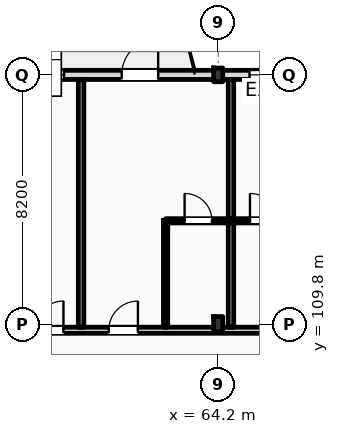
"""IFC4 building model, lengths in metres.
Left out: names, types, materials, properties, quantities, classifications, styles, units other than length and angle.
Written with IfcOpenShell. Run it as: python <this file> out.ifc"""

import sys

from ifc_helpers import new_model, si_unit, direction, frame, frame_2d, origin, origin_2d, place, context, subcontext, project, spatial, rectangle, i_section, extrude, element, fill, save


model = new_model("IFC4")
c1 = context("Model", 3, precision=1e-05, world=origin(), true_north=direction((0.0, 1.0)))
c2 = subcontext(c1, "Body", "Model", "MODEL_VIEW")
j1 = project(units=[si_unit("LENGTHUNIT", "METRE"), si_unit("PLANEANGLEUNIT", "RADIAN")], contexts=[c1])
p1 = place(None, origin())
s1 = spatial("IfcSite", under=j1, at=p1, CompositionType="ELEMENT")
p2 = place(p1, origin())
s2 = spatial("IfcBuilding", under=s1, at=p2, CompositionType="ELEMENT")
p3 = place(p2, frame((0.0, 0.0, 31.8)))
s3 = spatial("IfcBuildingStorey", under=s2, at=p3, CompositionType="ELEMENT", Elevation=31.8)
p4 = place(p3, frame((64.2, 109.8, 0.0), z_axis=(0.0, 0.0, 1.0), x_axis=(1.0, 0.0, 0.0)))
e1 = element("IfcColumn", 1, at=p4, inside=s3, PredefinedType="COLUMN", context=c2, shape_type="SweptSolid", body=[
    extrude(i_section(OverallWidth=0.3, OverallDepth=0.5, WebThickness=0.014, FlangeThickness=0.028, FilletRadius=0.027, at=origin_2d()), origin(), (0.0, 0.0, 1.0), 3.6),
])
p5 = place(p3, frame((64.2, 118.0, 0.0), z_axis=(0.0, 0.0, 1.0), x_axis=(1.0, 0.0, 0.0)))
e2 = element("IfcColumn", 2, at=p5, inside=s3, PredefinedType="COLUMN", context=c2, shape_type="SweptSolid", body=[
    extrude(i_section(OverallWidth=0.3, OverallDepth=0.45, WebThickness=0.014, FlangeThickness=0.026, FilletRadius=0.027, at=origin_2d()), origin(), (0.0, 0.0, 1.0), 3.6),
])
p6 = place(p3, frame((22.5, 118.0, 0.0), z_axis=(0.0, 0.0, 1.0), x_axis=(1.0, 0.0, 0.0)))
e3 = element("IfcWall", 3, at=p6, inside=s3, PredefinedType="STANDARD", context=c2, shape_type="SweptSolid", body=[
    extrude(rectangle(XDim=97.5, YDim=0.3, at=frame_2d((48.75, 0.0))), origin(), (0.0, 0.0, 1.0), 2.72),
])
p7 = place(p6, frame((3.61, 0.0, 0.9)))
e4 = element("IfcOpeningElement", 4, at=p7, cuts=e3, PredefinedType="OPENING", context=c2, shape_type="SweptSolid", body=[
    extrude(rectangle(XDim=1.1, YDim=1.64, at=frame_2d((0.55, 0.82))), frame((0.0, 0.16, 0.0), z_axis=(0.0, -1.0, 0.0), x_axis=(1.0, 0.0, 0.0)), (0.0, 0.0, 1.0), 0.32),
])
p8 = place(p6, frame((6.855, 0.0, 0.0)))
e5 = element("IfcOpeningElement", 5, at=p8, cuts=e3, PredefinedType="OPENING", context=c2, shape_type="SweptSolid", body=[
    extrude(rectangle(XDim=1.2, YDim=2.25, at=frame_2d((0.6, 1.125))), frame((0.0, 0.16, 0.0), z_axis=(0.0, -1.0, 0.0), x_axis=(1.0, 0.0, 0.0)), (0.0, 0.0, 1.0), 0.32),
])
p9 = place(p6, frame((11.405, 0.0, 0.9)))
e6 = element("IfcOpeningElement", 6, at=p9, cuts=e3, PredefinedType="OPENING", context=c2, shape_type="SweptSolid", body=[
    extrude(rectangle(XDim=2.1, YDim=1.64, at=frame_2d((1.05, 0.82))), frame((0.0, 0.16, 0.0), z_axis=(0.0, -1.0, 0.0), x_axis=(1.0, 0.0, 0.0)), (0.0, 0.0, 1.0), 0.32),
])
p10 = place(p6, frame((15.13, 0.0, 0.9)))
e7 = element("IfcOpeningElement", 7, at=p10, cuts=e3, PredefinedType="OPENING", context=c2, shape_type="SweptSolid", body=[
    extrude(rectangle(XDim=2.25, YDim=1.64, at=frame_2d((1.125, 0.82))), frame((0.0, 0.16, 0.0), z_axis=(0.0, -1.0, 0.0), x_axis=(1.0, 0.0, 0.0)), (0.0, 0.0, 1.0), 0.32),
])
p11 = place(p6, frame((21.53, 0.0, 0.0)))
e8 = element("IfcOpeningElement", 8, at=p11, cuts=e3, PredefinedType="OPENING", context=c2, shape_type="SweptSolid", body=[
    extrude(rectangle(XDim=1.2, YDim=2.25, at=frame_2d((0.6, 1.125))), frame((0.0, 0.16, 0.0), z_axis=(0.0, -1.0, 0.0), x_axis=(1.0, 0.0, 0.0)), (0.0, 0.0, 1.0), 0.32),
])
p12 = place(p6, frame((24.18, 0.0, 0.9)))
e9 = element("IfcOpeningElement", 9, at=p12, cuts=e3, PredefinedType="OPENING", context=c2, shape_type="SweptSolid", body=[
    extrude(rectangle(XDim=1.1, YDim=1.64, at=frame_2d((0.55, 0.82))), frame((0.0, 0.16, 0.0), z_axis=(0.0, -1.0, 0.0), x_axis=(1.0, 0.0, 0.0)), (0.0, 0.0, 1.0), 0.32),
])
p13 = place(p6, frame((29.105, 0.0, 0.9)))
e10 = element("IfcOpeningElement", 10, at=p13, cuts=e3, PredefinedType="OPENING", context=c2, shape_type="SweptSolid", body=[
    extrude(rectangle(XDim=2.7, YDim=1.64, at=frame_2d((1.35, 0.82))), frame((0.0, 0.16, 0.0), z_axis=(0.0, -1.0, 0.0), x_axis=(1.0, 0.0, 0.0)), (0.0, 0.0, 1.0), 0.32),
])
p14 = place(p6, frame((34.83, 0.0, 0.9)))
e11 = element("IfcOpeningElement", 11, at=p14, cuts=e3, PredefinedType="OPENING", context=c2, shape_type="SweptSolid", body=[
    extrude(rectangle(XDim=1.8, YDim=1.64, at=frame_2d((0.9, 0.82))), frame((0.0, 0.16, 0.0), z_axis=(0.0, -1.0, 0.0), x_axis=(1.0, 0.0, 0.0)), (0.0, 0.0, 1.0), 0.32),
])
p15 = place(p6, frame((38.525, 0.0, 0.0)))
e12 = element("IfcOpeningElement", 12, at=p15, cuts=e3, PredefinedType="OPENING", context=c2, shape_type="SweptSolid", body=[
    extrude(rectangle(XDim=1.2, YDim=2.25, at=frame_2d((0.6, 1.125))), frame((0.0, 0.16, 0.0), z_axis=(0.0, -1.0, 0.0), x_axis=(1.0, 0.0, 0.0)), (0.0, 0.0, 1.0), 0.32),
])
p16 = place(p6, frame((42.73, 0.0, 0.9)))
e13 = element("IfcOpeningElement", 13, at=p16, cuts=e3, PredefinedType="OPENING", context=c2, shape_type="SweptSolid", body=[
    extrude(rectangle(XDim=3.05, YDim=1.64, at=frame_2d((1.525, 0.82))), frame((0.0, 0.16, 0.0), z_axis=(0.0, -1.0, 0.0), x_axis=(1.0, 0.0, 0.0)), (0.0, 0.0, 1.0), 0.32),
])
p17 = place(p6, frame((47.155, 0.0, 0.9)))
e14 = element("IfcOpeningElement", 14, at=p17, cuts=e3, PredefinedType="OPENING", context=c2, shape_type="SweptSolid", body=[
    extrude(rectangle(XDim=1.35, YDim=1.64, at=frame_2d((0.675, 0.82))), frame((0.0, 0.16, 0.0), z_axis=(0.0, -1.0, 0.0), x_axis=(1.0, 0.0, 0.0)), (0.0, 0.0, 1.0), 0.32),
])
p18 = place(p6, frame((53.065, 0.0, 0.0)))
e15 = element("IfcOpeningElement", 15, at=p18, cuts=e3, PredefinedType="OPENING", context=c2, shape_type="SweptSolid", body=[
    extrude(rectangle(XDim=1.2, YDim=2.25, at=frame_2d((0.6, 1.125))), frame((0.0, 0.16, 0.0), z_axis=(0.0, -1.0, 0.0), x_axis=(1.0, 0.0, 0.0)), (0.0, 0.0, 1.0), 0.32),
])
p19 = place(p6, frame((58.2, 0.0, 0.9)))
e16 = element("IfcOpeningElement", 16, at=p19, cuts=e3, PredefinedType="OPENING", context=c2, shape_type="SweptSolid", body=[
    extrude(rectangle(XDim=1.8, YDim=1.64, at=frame_2d((0.9, 0.82))), frame((0.0, 0.16, 0.0), z_axis=(0.0, -1.0, 0.0), x_axis=(1.0, 0.0, 0.0)), (0.0, 0.0, 1.0), 0.32),
])
p20 = place(p6, frame((61.13, 0.0, 0.9)))
e17 = element("IfcOpeningElement", 17, at=p20, cuts=e3, PredefinedType="OPENING", context=c2, shape_type="SweptSolid", body=[
    extrude(rectangle(XDim=3.05, YDim=1.64, at=frame_2d((1.525, 0.82))), frame((0.0, 0.16, 0.0), z_axis=(0.0, -1.0, 0.0), x_axis=(1.0, 0.0, 0.0)), (0.0, 0.0, 1.0), 0.32),
])
p21 = place(p6, frame((67.93, 0.0, 0.0)))
e18 = element("IfcOpeningElement", 18, at=p21, cuts=e3, PredefinedType="OPENING", context=c2, shape_type="SweptSolid", body=[
    extrude(rectangle(XDim=1.2, YDim=2.25, at=frame_2d((0.6, 1.125))), frame((0.0, 0.16, 0.0), z_axis=(0.0, -1.0, 0.0), x_axis=(1.0, 0.0, 0.0)), (0.0, 0.0, 1.0), 0.32),
])
p22 = place(p6, frame((70.39, 0.0, 0.0)))
e19 = element("IfcOpeningElement", 19, at=p22, cuts=e3, PredefinedType="OPENING", context=c2, shape_type="SweptSolid", body=[
    extrude(rectangle(XDim=1.2, YDim=2.25, at=frame_2d((0.6, 1.125))), frame((0.0, 0.16, 0.0), z_axis=(0.0, -1.0, 0.0), x_axis=(1.0, 0.0, 0.0)), (0.0, 0.0, 1.0), 0.32),
])
p23 = place(p6, frame((75.905, 0.0, 0.9)))
e20 = element("IfcOpeningElement", 20, at=p23, cuts=e3, PredefinedType="OPENING", context=c2, shape_type="SweptSolid", body=[
    extrude(rectangle(XDim=1.1, YDim=1.5, at=frame_2d((0.55, 0.75))), frame((0.0, 0.16, 0.0), z_axis=(0.0, -1.0, 0.0), x_axis=(1.0, 0.0, 0.0)), (0.0, 0.0, 1.0), 0.32),
])
p24 = place(p6, frame((81.63, 0.0, 0.9)))
e21 = element("IfcOpeningElement", 21, at=p24, cuts=e3, PredefinedType="OPENING", context=c2, shape_type="SweptSolid", body=[
    extrude(rectangle(XDim=1.1, YDim=1.6, at=frame_2d((0.55, 0.8))), frame((0.0, 0.16, 0.0), z_axis=(0.0, -1.0, 0.0), x_axis=(1.0, 0.0, 0.0)), (0.0, 0.0, 1.0), 0.32),
])
p25 = place(p6, frame((84.955, 0.0, 0.9)))
e22 = element("IfcOpeningElement", 22, at=p25, cuts=e3, PredefinedType="OPENING", context=c2, shape_type="SweptSolid", body=[
    extrude(rectangle(XDim=1.4, YDim=1.64, at=frame_2d((0.7, 0.82))), frame((0.0, 0.16, 0.0), z_axis=(0.0, -1.0, 0.0), x_axis=(1.0, 0.0, 0.0)), (0.0, 0.0, 1.0), 0.32),
])
p26 = place(p6, frame((90.055, 0.0, 0.9)))
e23 = element("IfcOpeningElement", 23, at=p26, cuts=e3, PredefinedType="OPENING", context=c2, shape_type="SweptSolid", body=[
    extrude(rectangle(XDim=1.6, YDim=1.64, at=frame_2d((0.8, 0.82))), frame((0.0, 0.16, 0.0), z_axis=(0.0, -1.0, 0.0), x_axis=(1.0, 0.0, 0.0)), (0.0, 0.0, 1.0), 0.32),
])
p27 = place(p6, frame((93.87, 0.0, 0.9)))
e24 = element("IfcOpeningElement", 24, at=p27, cuts=e3, PredefinedType="OPENING", context=c2, shape_type="SweptSolid", body=[
    extrude(rectangle(XDim=1.75, YDim=1.64, at=frame_2d((0.875, 0.82))), frame((0.0, 0.16, 0.0), z_axis=(0.0, -1.0, 0.0), x_axis=(1.0, 0.0, 0.0)), (0.0, 0.0, 1.0), 0.32),
])
p28 = place(p3, frame((10.65, 109.6, 0.0), z_axis=(0.0, 0.0, 1.0), x_axis=(1.0, 0.0, 0.0)))
e25 = element("IfcWall", 25, at=p28, inside=s3, PredefinedType="PARTITIONING", context=c2, shape_type="SweptSolid", body=[
    extrude(rectangle(XDim=109.21, YDim=0.2, at=frame_2d((54.605, 0.0))), origin(), (0.0, 0.0, 1.0), 2.72),
])
p29 = place(p28, frame((15.825, 0.0, 0.0)))
e26 = element("IfcOpeningElement", 26, at=p29, cuts=e25, PredefinedType="OPENING", context=c2, shape_type="SweptSolid", body=[
    extrude(rectangle(XDim=1.02, YDim=2.2, at=frame_2d((0.51, 1.1))), frame((0.0, 0.11, 0.0), z_axis=(0.0, -1.0, 0.0), x_axis=(1.0, 0.0, 0.0)), (0.0, 0.0, 1.0), 0.22),
])
p30 = place(p28, frame((19.87, 0.0, 0.0)))
e27 = element("IfcOpeningElement", 27, at=p30, cuts=e25, PredefinedType="OPENING", context=c2, shape_type="SweptSolid", body=[
    extrude(rectangle(XDim=1.02, YDim=2.2, at=frame_2d((0.51, 1.1))), frame((0.0, 0.11, 0.0), z_axis=(0.0, -1.0, 0.0), x_axis=(1.0, 0.0, 0.0)), (0.0, 0.0, 1.0), 0.22),
])
p31 = place(p28, frame((24.47, 0.0, 0.0)))
e28 = element("IfcOpeningElement", 28, at=p31, cuts=e25, PredefinedType="OPENING", context=c2, shape_type="SweptSolid", body=[
    extrude(rectangle(XDim=1.02, YDim=2.2, at=frame_2d((0.51, 1.1))), frame((0.0, 0.11, 0.0), z_axis=(0.0, -1.0, 0.0), x_axis=(1.0, 0.0, 0.0)), (0.0, 0.0, 1.0), 0.22),
])
p32 = place(p28, frame((26.92, 0.0, 0.0)))
e29 = element("IfcOpeningElement", 29, at=p32, cuts=e25, PredefinedType="OPENING", context=c2, shape_type="SweptSolid", body=[
    extrude(rectangle(XDim=1.02, YDim=2.2, at=frame_2d((0.51, 1.1))), frame((0.0, 0.11, 0.0), z_axis=(0.0, -1.0, 0.0), x_axis=(1.0, 0.0, 0.0)), (0.0, 0.0, 1.0), 0.22),
])
p33 = place(p28, frame((33.7, 0.0, 0.0)))
e30 = element("IfcOpeningElement", 30, at=p33, cuts=e25, PredefinedType="OPENING", context=c2, shape_type="SweptSolid", body=[
    extrude(rectangle(XDim=0.96, YDim=2.2, at=frame_2d((0.48, 1.1))), frame((0.0, 0.11, 0.0), z_axis=(0.0, -1.0, 0.0), x_axis=(1.0, 0.0, 0.0)), (0.0, 0.0, 1.0), 0.22),
])
p34 = place(p28, frame((35.9, 0.0, 0.0)))
e31 = element("IfcOpeningElement", 31, at=p34, cuts=e25, PredefinedType="OPENING", context=c2, shape_type="SweptSolid", body=[
    extrude(rectangle(XDim=0.96, YDim=2.2, at=frame_2d((0.48, 1.1))), frame((0.0, 0.11, 0.0), z_axis=(0.0, -1.0, 0.0), x_axis=(1.0, 0.0, 0.0)), (0.0, 0.0, 1.0), 0.22),
])
p35 = place(p28, frame((42.9, 0.0, 0.0)))
e32 = element("IfcOpeningElement", 32, at=p35, cuts=e25, PredefinedType="OPENING", context=c2, shape_type="SweptSolid", body=[
    extrude(rectangle(XDim=0.96, YDim=2.2, at=frame_2d((0.48, 1.1))), frame((0.0, 0.11, 0.0), z_axis=(0.0, -1.0, 0.0), x_axis=(1.0, 0.0, 0.0)), (0.0, 0.0, 1.0), 0.22),
])
p36 = place(p28, frame((47.5, 0.0, 0.0)))
e33 = element("IfcOpeningElement", 33, at=p36, cuts=e25, PredefinedType="OPENING", context=c2, shape_type="SweptSolid", body=[
    extrude(rectangle(XDim=0.96, YDim=2.2, at=frame_2d((0.48, 1.1))), frame((0.0, 0.11, 0.0), z_axis=(0.0, -1.0, 0.0), x_axis=(1.0, 0.0, 0.0)), (0.0, 0.0, 1.0), 0.22),
])
p37 = place(p28, frame((49.95, 0.0, 0.0)))
e34 = element("IfcOpeningElement", 34, at=p37, cuts=e25, PredefinedType="OPENING", context=c2, shape_type="SweptSolid", body=[
    extrude(rectangle(XDim=0.96, YDim=2.2, at=frame_2d((0.48, 1.1))), frame((0.0, 0.11, 0.0), z_axis=(0.0, -1.0, 0.0), x_axis=(1.0, 0.0, 0.0)), (0.0, 0.0, 1.0), 0.22),
])
p38 = place(p28, frame((56.7, 0.0, 0.0)))
e35 = element("IfcOpeningElement", 35, at=p38, cuts=e25, PredefinedType="OPENING", context=c2, shape_type="SweptSolid", body=[
    extrude(rectangle(XDim=0.96, YDim=2.2, at=frame_2d((0.48, 1.1))), frame((0.0, 0.11, 0.0), z_axis=(0.0, -1.0, 0.0), x_axis=(1.0, 0.0, 0.0)), (0.0, 0.0, 1.0), 0.22),
])
p39 = place(p28, frame((59.15, 0.0, 0.0)))
e36 = element("IfcOpeningElement", 36, at=p39, cuts=e25, PredefinedType="OPENING", context=c2, shape_type="SweptSolid", body=[
    extrude(rectangle(XDim=0.96, YDim=2.2, at=frame_2d((0.48, 1.1))), frame((0.0, 0.11, 0.0), z_axis=(0.0, -1.0, 0.0), x_axis=(1.0, 0.0, 0.0)), (0.0, 0.0, 1.0), 0.22),
])
p40 = place(p28, frame((65.9, 0.0, 0.0)))
e37 = element("IfcOpeningElement", 37, at=p40, cuts=e25, PredefinedType="OPENING", context=c2, shape_type="SweptSolid", body=[
    extrude(rectangle(XDim=0.96, YDim=2.2, at=frame_2d((0.48, 1.1))), frame((0.0, 0.11, 0.0), z_axis=(0.0, -1.0, 0.0), x_axis=(1.0, 0.0, 0.0)), (0.0, 0.0, 1.0), 0.22),
])
p41 = place(p28, frame((70.5, 0.0, 0.0)))
e38 = element("IfcOpeningElement", 38, at=p41, cuts=e25, PredefinedType="OPENING", context=c2, shape_type="SweptSolid", body=[
    extrude(rectangle(XDim=0.96, YDim=2.2, at=frame_2d((0.48, 1.1))), frame((0.0, 0.11, 0.0), z_axis=(0.0, -1.0, 0.0), x_axis=(1.0, 0.0, 0.0)), (0.0, 0.0, 1.0), 0.22),
])
p42 = place(p28, frame((72.95, 0.0, 0.0)))
e39 = element("IfcOpeningElement", 39, at=p42, cuts=e25, PredefinedType="OPENING", context=c2, shape_type="SweptSolid", body=[
    extrude(rectangle(XDim=0.96, YDim=2.2, at=frame_2d((0.48, 1.1))), frame((0.0, 0.11, 0.0), z_axis=(0.0, -1.0, 0.0), x_axis=(1.0, 0.0, 0.0)), (0.0, 0.0, 1.0), 0.22),
])
p43 = place(p28, frame((79.7, 0.0, 0.0)))
e40 = element("IfcOpeningElement", 40, at=p43, cuts=e25, PredefinedType="OPENING", context=c2, shape_type="SweptSolid", body=[
    extrude(rectangle(XDim=0.96, YDim=2.2, at=frame_2d((0.48, 1.1))), frame((0.0, 0.11, 0.0), z_axis=(0.0, -1.0, 0.0), x_axis=(1.0, 0.0, 0.0)), (0.0, 0.0, 1.0), 0.22),
])
p44 = place(p28, frame((82.15, 0.0, 0.0)))
e41 = element("IfcOpeningElement", 41, at=p44, cuts=e25, PredefinedType="OPENING", context=c2, shape_type="SweptSolid", body=[
    extrude(rectangle(XDim=0.96, YDim=2.2, at=frame_2d((0.48, 1.1))), frame((0.0, 0.11, 0.0), z_axis=(0.0, -1.0, 0.0), x_axis=(1.0, 0.0, 0.0)), (0.0, 0.0, 1.0), 0.22),
])
p45 = place(p28, frame((88.9, 0.0, 0.0)))
e42 = element("IfcOpeningElement", 42, at=p45, cuts=e25, PredefinedType="OPENING", context=c2, shape_type="SweptSolid", body=[
    extrude(rectangle(XDim=0.96, YDim=2.2, at=frame_2d((0.48, 1.1))), frame((0.0, 0.11, 0.0), z_axis=(0.0, -1.0, 0.0), x_axis=(1.0, 0.0, 0.0)), (0.0, 0.0, 1.0), 0.22),
])
p46 = place(p28, frame((93.75, 0.0, 0.0)))
e43 = element("IfcOpeningElement", 43, at=p46, cuts=e25, PredefinedType="OPENING", context=c2, shape_type="SweptSolid", body=[
    extrude(rectangle(XDim=0.96, YDim=2.2, at=frame_2d((0.48, 1.1))), frame((0.0, 0.11, 0.0), z_axis=(0.0, -1.0, 0.0), x_axis=(1.0, 0.0, 0.0)), (0.0, 0.0, 1.0), 0.22),
])
p47 = place(p28, frame((98.1, 0.0, 0.0)))
e44 = element("IfcOpeningElement", 44, at=p47, cuts=e25, PredefinedType="OPENING", context=c2, shape_type="SweptSolid", body=[
    extrude(rectangle(XDim=0.96, YDim=2.2, at=frame_2d((0.48, 1.1))), frame((0.0, 0.11, 0.0), z_axis=(0.0, -1.0, 0.0), x_axis=(1.0, 0.0, 0.0)), (0.0, 0.0, 1.0), 0.22),
])
p48 = place(p28, frame((102.7, 0.0, 0.0)))
e45 = element("IfcOpeningElement", 45, at=p48, cuts=e25, PredefinedType="OPENING", context=c2, shape_type="SweptSolid", body=[
    extrude(rectangle(XDim=0.96, YDim=2.2, at=frame_2d((0.48, 1.1))), frame((0.0, 0.11, 0.0), z_axis=(0.0, -1.0, 0.0), x_axis=(1.0, 0.0, 0.0)), (0.0, 0.0, 1.0), 0.22),
])
p49 = place(p28, frame((105.04, 0.0, 0.0)))
e46 = element("IfcOpeningElement", 46, at=p49, cuts=e25, PredefinedType="OPENING", context=c2, shape_type="SweptSolid", body=[
    extrude(rectangle(XDim=0.96, YDim=2.2, at=frame_2d((0.48, 1.1))), frame((0.0, 0.11, 0.0), z_axis=(0.0, -1.0, 0.0), x_axis=(1.0, 0.0, 0.0)), (0.0, 0.0, 1.0), 0.22),
])
p50 = place(p28, frame((2.716, 0.0, 0.0)))
e47 = element("IfcOpeningElement", 47, at=p50, cuts=e25, PredefinedType="OPENING", context=c2, shape_type="SweptSolid", body=[
    extrude(rectangle(XDim=1.35, YDim=2.25, at=frame_2d((0.675, 1.125))), frame((0.0, 0.11, 0.0), z_axis=(0.0, -1.0, 0.0), x_axis=(1.0, 0.0, 0.0)), (0.0, 0.0, 1.0), 0.22),
])
p51 = place(p28, frame((6.65, 0.0, 0.0)))
e48 = element("IfcOpeningElement", 48, at=p51, cuts=e25, PredefinedType="OPENING", context=c2, shape_type="SweptSolid", body=[
    extrude(rectangle(XDim=1.35, YDim=2.25, at=frame_2d((0.675, 1.125))), frame((0.0, 0.11, 0.0), z_axis=(0.0, -1.0, 0.0), x_axis=(1.0, 0.0, 0.0)), (0.0, 0.0, 1.0), 0.22),
])
p52 = place(p28, frame((10.583, 0.0, 0.0)))
e49 = element("IfcOpeningElement", 49, at=p52, cuts=e25, PredefinedType="OPENING", context=c2, shape_type="SweptSolid", body=[
    extrude(rectangle(XDim=1.35, YDim=2.25, at=frame_2d((0.675, 1.125))), frame((0.0, 0.11, 0.0), z_axis=(0.0, -1.0, 0.0), x_axis=(1.0, 0.0, 0.0)), (0.0, 0.0, 1.0), 0.22),
])
for number, where, z_axis, x_axis in (
    (50, (59.69, 109.7, 0.0), (0.0, 0.0, 1.0), (0.0, 1.0, 0.0)),
    (51, (64.62, 109.7, 0.0), (0.0, 0.0, 1.0), (0.0, 1.0, 0.0)),
):
    element("IfcWall", number, at=place(p3, frame(where, z_axis=z_axis, x_axis=x_axis)), inside=s3, PredefinedType="PARTITIONING", context=c2, shape_type="SweptSolid", body=[
        extrude(rectangle(XDim=8.15, YDim=0.18, at=frame_2d((4.075, 0.0))), origin(), (0.0, 0.0, 1.0), 3.36),
    ])
p53 = place(p3, frame((62.47, 109.7, 0.0), z_axis=(0.0, 0.0, 1.0), x_axis=(0.0, 1.0, 0.0)))
e52 = element("IfcWall", 52, at=p53, inside=s3, PredefinedType="PARTITIONING", context=c2, shape_type="SweptSolid", body=[
    extrude(rectangle(XDim=3.5, YDim=0.14, at=frame_2d((1.75, 0.0))), origin(), (0.0, 0.0, 1.0), 3.36),
])
p54 = place(p3, frame((62.47, 113.2, 0.0), z_axis=(0.0, 0.0, 1.0), x_axis=(1.0, 0.0, 0.0)))
e53 = element("IfcWall", 53, at=p54, inside=s3, PredefinedType="PARTITIONING", context=c2, shape_type="SweptSolid", body=[
    extrude(rectangle(XDim=2.15, YDim=0.14, at=frame_2d((1.075, 0.0))), origin(), (0.0, 0.0, 1.0), 3.36),
])
p55 = place(p54, frame((0.625, 0.0, 0.0)))
e54 = element("IfcOpeningElement", 54, at=p55, cuts=e53, PredefinedType="OPENING", context=c2, shape_type="SweptSolid", body=[
    extrude(rectangle(XDim=0.9, YDim=2.1, at=frame_2d((0.45, 1.05))), frame((0.0, 0.08, 0.0), z_axis=(0.0, -1.0, 0.0), x_axis=(1.0, 0.0, 0.0)), (0.0, 0.0, 1.0), 0.16),
])
p56 = place(p3, frame((64.62, 113.2, 0.0), z_axis=(0.0, 0.0, 1.0), x_axis=(1.0, 0.0, 0.0)))
e55 = element("IfcWall", 55, at=p56, inside=s3, PredefinedType="PARTITIONING", context=c2, shape_type="SweptSolid", body=[
    extrude(rectangle(XDim=2.15, YDim=0.14, at=frame_2d((1.075, 0.0))), origin(), (0.0, 0.0, 1.0), 3.36),
])
p57 = place(p56, frame((0.625, 0.0, 0.0)))
e56 = element("IfcOpeningElement", 56, at=p57, cuts=e55, PredefinedType="OPENING", context=c2, shape_type="SweptSolid", body=[
    extrude(rectangle(XDim=0.9, YDim=2.1, at=frame_2d((0.45, 1.05))), frame((0.0, 0.08, 0.0), z_axis=(0.0, -1.0, 0.0), x_axis=(1.0, 0.0, 0.0)), (0.0, 0.0, 1.0), 0.16),
])
p58 = place(p14, origin())
e57 = element("IfcWindow", 57, at=p58, inside=s3, PartitioningType="DOUBLE_PANEL_VERTICAL", PredefinedType="WINDOW", context=c2, shape_type="SweptSolid", body=[
    extrude(rectangle(XDim=1.8, YDim=1.64, at=frame_2d((0.9, 0.82))), frame((0.0, 0.03, 0.0), z_axis=(0.0, -1.0, 0.0), x_axis=(1.0, 0.0, 0.0)), (0.0, 0.0, 1.0), 0.06),
])
fill(e11, e57)
p59 = place(p15, origin())
e58 = element("IfcDoor", 58, at=p59, inside=s3, OperationType="SINGLE_SWING_RIGHT", PredefinedType="DOOR", context=c2, shape_type="SweptSolid", body=[
    extrude(rectangle(XDim=1.2, YDim=2.25, at=frame_2d((0.6, 1.125))), frame((0.0, 0.025, 0.0), z_axis=(0.0, -1.0, 0.0), x_axis=(1.0, 0.0, 0.0)), (0.0, 0.0, 1.0), 0.05),
])
fill(e12, e58)
p60 = place(p16, origin())
e59 = element("IfcWindow", 59, at=p60, inside=s3, PartitioningType="DOUBLE_PANEL_VERTICAL", PredefinedType="WINDOW", context=c2, shape_type="SweptSolid", body=[
    extrude(rectangle(XDim=3.05, YDim=1.64, at=frame_2d((1.525, 0.82))), frame((0.0, 0.03, 0.0), z_axis=(0.0, -1.0, 0.0), x_axis=(1.0, 0.0, 0.0)), (0.0, 0.0, 1.0), 0.06),
])
fill(e13, e59)
p61 = place(p36, origin())
e60 = element("IfcDoor", 60, at=p61, inside=s3, OperationType="SINGLE_SWING_RIGHT", PredefinedType="DOOR", context=c2, shape_type="SweptSolid", body=[
    extrude(rectangle(XDim=0.96, YDim=2.2, at=frame_2d((0.48, 1.1))), frame((0.0, 0.025, 0.0), z_axis=(0.0, -1.0, 0.0), x_axis=(1.0, 0.0, 0.0)), (0.0, 0.0, 1.0), 0.05),
])
fill(e33, e60)
p62 = place(p37, origin())
e61 = element("IfcDoor", 61, at=p62, inside=s3, OperationType="SINGLE_SWING_RIGHT", PredefinedType="DOOR", context=c2, shape_type="SweptSolid", body=[
    extrude(rectangle(XDim=0.96, YDim=2.2, at=frame_2d((0.48, 1.1))), frame((0.0, 0.025, 0.0), z_axis=(0.0, -1.0, 0.0), x_axis=(1.0, 0.0, 0.0)), (0.0, 0.0, 1.0), 0.05),
])
fill(e34, e61)
p63 = place(p55, origin())
e62 = element("IfcDoor", 62, at=p63, inside=s3, OperationType="SINGLE_SWING_LEFT", PredefinedType="DOOR", context=c2, shape_type="SweptSolid", body=[
    extrude(rectangle(XDim=0.9, YDim=2.1, at=frame_2d((0.45, 1.05))), frame((0.0, 0.025, 0.0), z_axis=(0.0, -1.0, 0.0), x_axis=(1.0, 0.0, 0.0)), (0.0, 0.0, 1.0), 0.05),
])
fill(e54, e62)
p64 = place(p57, origin())
e63 = element("IfcDoor", 63, at=p64, inside=s3, OperationType="SINGLE_SWING_LEFT", PredefinedType="DOOR", context=c2, shape_type="SweptSolid", body=[
    extrude(rectangle(XDim=0.9, YDim=2.1, at=frame_2d((0.45, 1.05))), frame((0.0, 0.025, 0.0), z_axis=(0.0, -1.0, 0.0), x_axis=(1.0, 0.0, 0.0)), (0.0, 0.0, 1.0), 0.05),
])
fill(e56, e63)
save(model, sys.argv[1])
